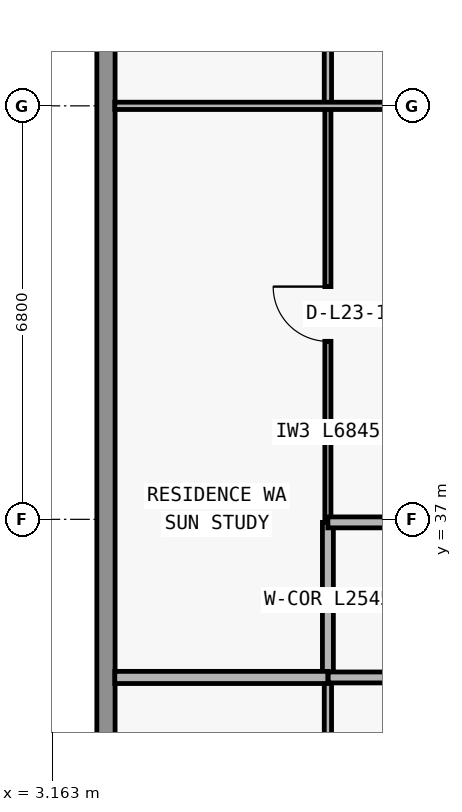
"""IFC4 building model, lengths in metres.
Left out: names, types, materials, properties, quantities, classifications, styles, units other than length and angle.
Written with IfcOpenShell. Run it as: python <this file> out.ifc"""

import sys

from ifc_helpers import new_model, si_unit, direction, frame, frame_2d, origin, place, context, subcontext, project, spatial, rectangle, extrude, element, fill, save


model = new_model("IFC4")
c1 = context("Model", 3, precision=1e-05, world=origin(), true_north=direction((0.0, 1.0)))
c2 = subcontext(c1, "Body", "Model", "MODEL_VIEW")
j1 = project(units=[si_unit("LENGTHUNIT", "METRE"), si_unit("PLANEANGLEUNIT", "RADIAN")], contexts=[c1])
p1 = place(None, origin())
s1 = spatial("IfcSite", under=j1, at=p1, CompositionType="ELEMENT")
p2 = place(p1, origin())
s2 = spatial("IfcBuilding", under=s1, at=p2, CompositionType="ELEMENT")
p3 = place(p2, frame((0.0, 0.0, 87.9)))
s3 = spatial("IfcBuildingStorey", under=s2, at=p3, CompositionType="ELEMENT", Elevation=87.9)
p4 = place(p3, frame((4.05, 28.0, 0.0), z_axis=(0.0, 0.0, 1.0), x_axis=(0.0, 1.0, 0.0)))
e1 = element("IfcWall", 1, at=p4, inside=s3, PredefinedType="STANDARD", context=c2, shape_type="SweptSolid", body=[
    extrude(rectangle(XDim=19.2, YDim=0.3, at=frame_2d((9.6, 0.0))), origin(), (0.0, 0.0, 1.0), 3.05),
])
p5 = place(p3, frame((7.7, 27.44, 0.0), z_axis=(0.0, 0.0, 1.0), x_axis=(0.0, 1.0, 0.0)))
e2 = element("IfcWall", 2, at=p5, inside=s3, PredefinedType="PARTITIONING", context=c2, shape_type="SweptSolid", body=[
    extrude(rectangle(XDim=6.96, YDim=0.12, at=frame_2d((3.48, 0.0))), origin(), (0.0, 0.0, 1.0), 3.05),
])
p6 = place(p3, frame((7.7, 34.405, 0.0), z_axis=(0.0, 0.0, 1.0), x_axis=(0.0, 1.0, 0.0)))
e3 = element("IfcWall", 3, at=p6, inside=s3, PredefinedType="PARTITIONING", context=c2, shape_type="SweptSolid", body=[
    extrude(rectangle(XDim=2.545, YDim=0.18, at=frame_2d((1.272, 0.0))), origin(), (0.0, 0.0, 1.0), 3.05),
])
p7 = place(p3, frame((7.7, 36.955, 0.0), z_axis=(0.0, 0.0, 1.0), x_axis=(0.0, 1.0, 0.0)))
e4 = element("IfcWall", 4, at=p7, inside=s3, PredefinedType="MOVABLE", context=c2, shape_type="SweptSolid", body=[
    extrude(rectangle(XDim=6.845, YDim=0.1, at=frame_2d((3.422, 0.0))), origin(), (0.0, 0.0, 1.0), 3.05),
])
p8 = place(p7, frame((2.972, 0.0, 0.0)))
e5 = element("IfcOpeningElement", 5, at=p8, cuts=e4, PredefinedType="OPENING", context=c2, shape_type="SweptSolid", body=[
    extrude(rectangle(XDim=0.9, YDim=2.15, at=frame_2d((0.45, 1.075))), frame((0.0, 0.06, 0.0), z_axis=(0.0, -1.0, 0.0), x_axis=(1.0, 0.0, 0.0)), (0.0, 0.0, 1.0), 0.12),
])
p9 = place(p3, frame((7.7, 43.805, 0.0), z_axis=(0.0, 0.0, 1.0), x_axis=(0.0, 1.0, 0.0)))
e6 = element("IfcWall", 6, at=p9, inside=s3, PredefinedType="PARTITIONING", context=c2, shape_type="SweptSolid", body=[
    extrude(rectangle(XDim=3.275, YDim=0.12, at=frame_2d((1.638, 0.0))), origin(), (0.0, 0.0, 1.0), 3.05),
])
p10 = place(p9, frame((1.188, 0.0, 0.0)))
e7 = element("IfcOpeningElement", 7, at=p10, cuts=e6, PredefinedType="OPENING", context=c2, shape_type="SweptSolid", body=[
    extrude(rectangle(XDim=0.9, YDim=2.15, at=frame_2d((0.45, 1.075))), frame((0.0, 0.07, 0.0), z_axis=(0.0, -1.0, 0.0), x_axis=(1.0, 0.0, 0.0)), (0.0, 0.0, 1.0), 0.14),
])
p11 = place(p3, frame((4.195, 34.4, 0.0), z_axis=(0.0, 0.0, 1.0), x_axis=(1.0, 0.0, 0.0)))
e8 = element("IfcWall", 8, at=p11, inside=s3, PredefinedType="PARTITIONING", context=c2, shape_type="SweptSolid", body=[
    extrude(rectangle(XDim=3.505, YDim=0.2, at=frame_2d((1.752, 0.0))), origin(), (0.0, 0.0, 1.0), 3.05),
])
p12 = place(p3, frame((7.705, 34.4, 0.0), z_axis=(0.0, 0.0, 1.0), x_axis=(1.0, 0.0, 0.0)))
e9 = element("IfcWall", 9, at=p12, inside=s3, PredefinedType="PARTITIONING", context=c2, shape_type="SweptSolid", body=[
    extrude(rectangle(XDim=10.545, YDim=0.18, at=frame_2d((5.272, 0.0))), origin(), (0.0, 0.0, 1.0), 3.05),
])
p13 = place(p12, frame((5.07, 0.0, 0.0)))
e10 = element("IfcOpeningElement", 10, at=p13, cuts=e9, PredefinedType="OPENING", context=c2, shape_type="SweptSolid", body=[
    extrude(rectangle(XDim=1.0, YDim=2.2, at=frame_2d((0.5, 1.1))), frame((0.0, 0.1, 0.0), z_axis=(0.0, -1.0, 0.0), x_axis=(1.0, 0.0, 0.0)), (0.0, 0.0, 1.0), 0.2),
])
p14 = place(p3, frame((7.7, 36.95, 0.0), z_axis=(0.0, 0.0, 1.0), x_axis=(1.0, 0.0, 0.0)))
e11 = element("IfcWall", 11, at=p14, inside=s3, PredefinedType="PARTITIONING", context=c2, shape_type="SweptSolid", body=[
    extrude(rectangle(XDim=10.145, YDim=0.18, at=frame_2d((5.073, 0.0))), origin(), (0.0, 0.0, 1.0), 3.05),
])
p15 = place(p14, frame((5.188, 0.0, 0.0)))
e12 = element("IfcOpeningElement", 12, at=p15, cuts=e11, PredefinedType="OPENING", context=c2, shape_type="SweptSolid", body=[
    extrude(rectangle(XDim=1.0, YDim=2.2, at=frame_2d((0.5, 1.1))), frame((0.0, 0.1, 0.0), z_axis=(0.0, -1.0, 0.0), x_axis=(1.0, 0.0, 0.0)), (0.0, 0.0, 1.0), 0.2),
])
p16 = place(p3, frame((4.195, 43.8, 0.0), z_axis=(0.0, 0.0, 1.0), x_axis=(1.0, 0.0, 0.0)))
e13 = element("IfcWall", 13, at=p16, inside=s3, PredefinedType="PARTITIONING", context=c2, shape_type="SweptSolid", body=[
    extrude(rectangle(XDim=13.66, YDim=0.12, at=frame_2d((6.83, 0.0))), origin(), (0.0, 0.0, 1.0), 2.339),
])
p17 = place(p16, frame((8.743, 0.0, 0.0)))
e14 = element("IfcOpeningElement", 14, at=p17, cuts=e13, PredefinedType="OPENING", context=c2, shape_type="SweptSolid", body=[
    extrude(rectangle(XDim=0.9, YDim=2.15, at=frame_2d((0.45, 1.075))), frame((0.0, 0.07, 0.0), z_axis=(0.0, -1.0, 0.0), x_axis=(1.0, 0.0, 0.0)), (0.0, 0.0, 1.0), 0.14),
])
p18 = place(p16, frame((12.107, 0.0, 0.0)))
e15 = element("IfcOpeningElement", 15, at=p18, cuts=e13, PredefinedType="OPENING", context=c2, shape_type="SweptSolid", body=[
    extrude(rectangle(XDim=0.85, YDim=2.1, at=frame_2d((0.425, 1.05))), frame((0.0, 0.07, 0.0), z_axis=(0.0, -1.0, 0.0), x_axis=(1.0, 0.0, 0.0)), (0.0, 0.0, 1.0), 0.14),
])
p19 = place(p8, origin())
e16 = element("IfcDoor", 16, at=p19, inside=s3, OperationType="SINGLE_SWING_RIGHT", PredefinedType="DOOR", context=c2, shape_type="SweptSolid", body=[
    extrude(rectangle(XDim=0.9, YDim=2.15, at=frame_2d((0.45, 1.075))), frame((0.0, 0.025, 0.0), z_axis=(0.0, -1.0, 0.0), x_axis=(1.0, 0.0, 0.0)), (0.0, 0.0, 1.0), 0.05),
])
fill(e5, e16)
save(model, sys.argv[1])
